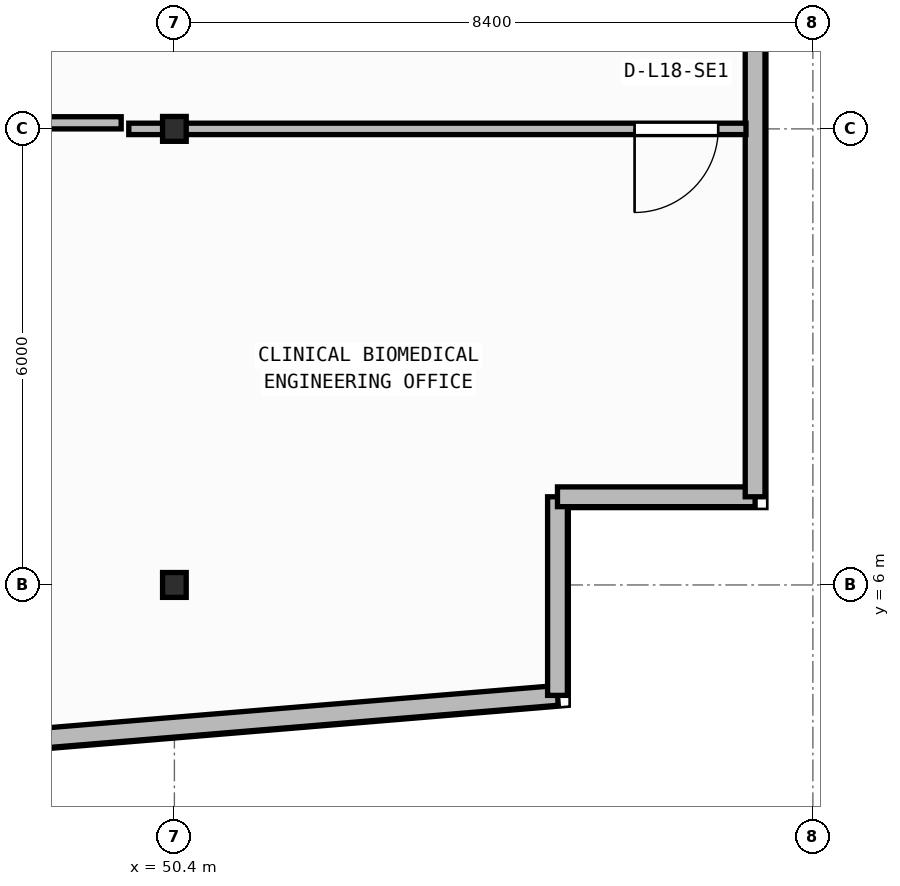
"""IFC4 building model, lengths in metres.
Left out: names, types, materials, properties, quantities, classifications, styles, units other than length and angle.
Written with IfcOpenShell. Run it as: python <this file> out.ifc"""

import sys

from ifc_helpers import new_model, si_unit, direction, frame, frame_2d, origin, origin_2d, place, context, subcontext, project, spatial, rectangle, i_section, extrude, element, fill, save


model = new_model("IFC4")
c1 = context("Model", 3, precision=1e-05, world=origin(), true_north=direction((0.0, 1.0)))
c2 = subcontext(c1, "Body", "Model", "MODEL_VIEW")
j1 = project(units=[si_unit("LENGTHUNIT", "METRE"), si_unit("PLANEANGLEUNIT", "RADIAN")], contexts=[c1])
p1 = place(None, origin())
s1 = spatial("IfcSite", under=j1, at=p1, CompositionType="ELEMENT")
p2 = place(p1, origin())
s2 = spatial("IfcBuilding", under=s1, at=p2, CompositionType="ELEMENT")
p3 = place(p2, frame((0.0, 0.0, 73.85)))
s3 = spatial("IfcBuildingStorey", under=s2, at=p3, CompositionType="ELEMENT", Elevation=73.85)
for number, where, z_axis, x_axis in (
    (1, (50.4, 6.0, 0.0), (0.0, 0.0, 1.0), (1.0, 0.0, 0.0)),
    (2, (50.4, 12.0, 0.0), (0.0, 0.0, 1.0), (1.0, 0.0, 0.0)),
):
    element("IfcColumn", number, at=place(p3, frame(where, z_axis=z_axis, x_axis=x_axis)), inside=s3, PredefinedType="COLUMN", context=c2, shape_type="SweptSolid", body=[
        extrude(i_section(OverallWidth=0.311, OverallDepth=0.327, WebThickness=0.016, FlangeThickness=0.025, FilletRadius=0.017, at=origin_2d()), origin(), (0.0, 0.0, 1.0), 3.95),
    ])
p4 = place(p3, frame((2.76, 0.174, 0.0), z_axis=(0.0, 0.0, 1.0), x_axis=(0.996571478456, 0.082736257641, 0.0)))
e3 = element("IfcWall", 3, at=p4, inside=s3, PredefinedType="STANDARD", context=c2, shape_type="SweptSolid", body=[
    extrude(rectangle(XDim=52.861, YDim=0.26, at=frame_2d((26.431, 0.0))), origin(), (0.0, 0.0, 1.0), 3.71),
])
p5 = place(p4, frame((25.231, 0.0, 0.9)))
e4 = element("IfcOpeningElement", 4, at=p5, cuts=e3, PredefinedType="OPENING", context=c2, shape_type="SweptSolid", body=[
    extrude(rectangle(XDim=2.4, YDim=1.65, at=frame_2d((1.2, 0.825))), frame((0.0, 0.14, 0.0), z_axis=(0.0, -1.0, 0.0), x_axis=(1.0, 0.0, 0.0)), (0.0, 0.0, 1.0), 0.28),
])
p6 = place(p3, frame((55.44, 4.547, 0.0), z_axis=(0.0, 0.0, 1.0), x_axis=(0.0, 1.0, 0.0)))
e5 = element("IfcWall", 5, at=p6, inside=s3, PredefinedType="STANDARD", context=c2, shape_type="SweptSolid", body=[
    extrude(rectangle(XDim=2.613, YDim=0.26, at=frame_2d((1.306, 0.0))), origin(), (0.0, 0.0, 1.0), 3.71),
])
p7 = place(p3, frame((55.44, 7.16, 0.0), z_axis=(0.0, 0.0, 1.0), x_axis=(1.0, 0.0, 0.0)))
e6 = element("IfcWall", 6, at=p7, inside=s3, PredefinedType="STANDARD", context=c2, shape_type="SweptSolid", body=[
    extrude(rectangle(XDim=2.6, YDim=0.26, at=frame_2d((1.3, 0.0))), origin(), (0.0, 0.0, 1.0), 3.71),
])
p8 = place(p3, frame((58.04, 7.16, 0.0), z_axis=(0.0, 0.0, 1.0), x_axis=(0.0, 1.0, 0.0)))
e7 = element("IfcWall", 7, at=p8, inside=s3, PredefinedType="STANDARD", context=c2, shape_type="SweptSolid", body=[
    extrude(rectangle(XDim=24.48, YDim=0.26, at=frame_2d((12.24, 0.0))), origin(), (0.0, 0.0, 1.0), 3.71),
])
p9 = place(p8, frame((11.59, 0.0, 0.0)))
e8 = element("IfcOpeningElement", 8, at=p9, cuts=e7, PredefinedType="OPENING", context=c2, shape_type="SweptSolid", body=[
    extrude(rectangle(XDim=1.3, YDim=2.15, at=frame_2d((0.65, 1.075))), frame((0.0, 0.14, 0.0), z_axis=(0.0, -1.0, 0.0), x_axis=(1.0, 0.0, 0.0)), (0.0, 0.0, 1.0), 0.28),
])
p10 = place(p3, frame((57.92, 12.0, 0.0), z_axis=(0.0, 0.0, 1.0), x_axis=(-1.0, 0.0, 0.0)))
e9 = element("IfcWall", 9, at=p10, inside=s3, PredefinedType="PARTITIONING", context=c2, shape_type="SweptSolid", body=[
    extrude(rectangle(XDim=8.12, YDim=0.15, at=frame_2d((4.06, 0.0))), origin(), (0.0, 0.0, 1.0), 3.073),
])
p11 = place(p10, frame((0.365, 0.0, 0.0)))
e10 = element("IfcOpeningElement", 10, at=p11, cuts=e9, PredefinedType="OPENING", context=c2, shape_type="SweptSolid", body=[
    extrude(rectangle(XDim=1.1, YDim=2.1, at=frame_2d((0.55, 1.05))), frame((0.0, 0.085, 0.0), z_axis=(0.0, -1.0, 0.0), x_axis=(1.0, 0.0, 0.0)), (0.0, 0.0, 1.0), 0.17),
])
p12 = place(p3, frame((46.689, 12.08, 0.0), z_axis=(0.0, 0.0, 1.0), x_axis=(1.0, 0.0, 0.0)))
e11 = element("IfcWall", 11, at=p12, inside=s3, PredefinedType="PARTITIONING", context=c2, shape_type="SweptSolid", body=[
    extrude(rectangle(XDim=3.011, YDim=0.16, at=frame_2d((1.505, 0.0))), origin(), (0.0, 0.0, 1.0), 3.073),
])
p13 = place(p11, origin())
e12 = element("IfcDoor", 12, at=p13, inside=s3, OperationType="SINGLE_SWING_RIGHT", PredefinedType="DOOR", context=c2, shape_type="SweptSolid", body=[
    extrude(rectangle(XDim=1.1, YDim=2.1, at=frame_2d((0.55, 1.05))), frame((0.0, 0.025, 0.0), z_axis=(0.0, -1.0, 0.0), x_axis=(1.0, 0.0, 0.0)), (0.0, 0.0, 1.0), 0.05),
])
fill(e10, e12)
save(model, sys.argv[1])
